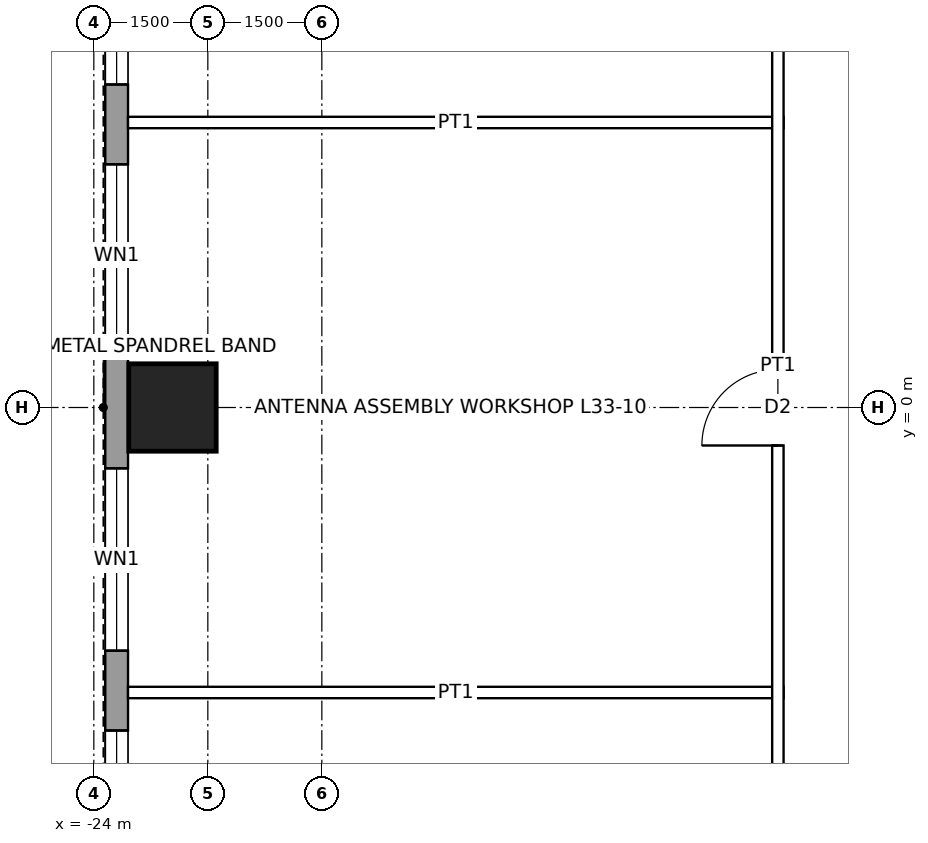
"""IFC4 building model, lengths in metres.
Left out: names, types, materials, properties, quantities, classifications, styles, units other than length and angle.
Written with IfcOpenShell. Run it as: python <this file> out.ifc"""

import sys

from ifc_helpers import new_model, si_unit, direction, frame, frame_2d, origin, origin_2d, place, context, subcontext, project, spatial, rectangle, hollow_rectangle, extrude, element, fill, save


model = new_model("IFC4")
c1 = context("Model", 3, precision=1e-05, world=origin(), true_north=direction((0.0, 1.0)))
c2 = subcontext(c1, "Body", "Model", "MODEL_VIEW")
j1 = project(units=[si_unit("LENGTHUNIT", "METRE"), si_unit("PLANEANGLEUNIT", "RADIAN")], contexts=[c1])
p1 = place(None, origin())
s1 = spatial("IfcSite", under=j1, at=p1, CompositionType="ELEMENT")
p2 = place(p1, origin())
s2 = spatial("IfcBuilding", under=s1, at=p2, CompositionType="ELEMENT")
p3 = place(p2, frame((0.0, 0.0, 162.9)))
s3 = spatial("IfcBuildingStorey", under=s2, at=p3, CompositionType="ELEMENT", Elevation=162.9)
p4 = place(p3, frame((-22.965, 0.0, 0.0), z_axis=(0.0, 0.0, 1.0), x_axis=(1.0, 0.0, 0.0)))
e1 = element("IfcColumn", 1, at=p4, inside=s3, PredefinedType="COLUMN", context=c2, shape_type="SweptSolid", body=[
    extrude(hollow_rectangle(XDim=1.15, YDim=1.15, WallThickness=0.075, at=origin_2d()), origin(), (0.0, 0.0, 1.0), 4.5),
])
p5 = place(p3, frame((-23.7, -16.2, 0.0), z_axis=(0.0, 0.0, 1.0), x_axis=(0.0, 1.0, 0.0)))
e2 = element("IfcWall", 2, at=p5, inside=s3, PredefinedType="SOLIDWALL", context=c2, shape_type="SweptSolid", body=[
    extrude(rectangle(XDim=32.4, YDim=0.3, at=frame_2d((16.2, 0.0))), origin(), (0.0, 0.0, 1.0), 4.3),
])
p6 = place(p5, frame((5.35, 0.0, 1.0)))
e3 = element("IfcOpeningElement", 3, at=p6, cuts=e2, PredefinedType="OPENING", context=c2, shape_type="SweptSolid", body=[
    extrude(rectangle(XDim=1.8, YDim=1.2, at=frame_2d((0.9, 0.6))), frame((0.0, 0.16, 0.0), z_axis=(0.0, -1.0, 0.0), x_axis=(1.0, 0.0, 0.0)), (0.0, 0.0, 1.0), 0.32),
])
p7 = place(p5, frame((7.45, 0.0, 1.0)))
e4 = element("IfcOpeningElement", 4, at=p7, cuts=e2, PredefinedType="OPENING", context=c2, shape_type="SweptSolid", body=[
    extrude(rectangle(XDim=1.8, YDim=1.2, at=frame_2d((0.9, 0.6))), frame((0.0, 0.16, 0.0), z_axis=(0.0, -1.0, 0.0), x_axis=(1.0, 0.0, 0.0)), (0.0, 0.0, 1.0), 0.32),
])
p8 = place(p5, frame((9.55, 0.0, 1.0)))
e5 = element("IfcOpeningElement", 5, at=p8, cuts=e2, PredefinedType="OPENING", context=c2, shape_type="SweptSolid", body=[
    extrude(rectangle(XDim=2.4, YDim=1.2, at=frame_2d((1.2, 0.6))), frame((0.0, 0.16, 0.0), z_axis=(0.0, -1.0, 0.0), x_axis=(1.0, 0.0, 0.0)), (0.0, 0.0, 1.0), 0.32),
])
p9 = place(p5, frame((13.0, 0.0, 1.0)))
e6 = element("IfcOpeningElement", 6, at=p9, cuts=e2, PredefinedType="OPENING", context=c2, shape_type="SweptSolid", body=[
    extrude(rectangle(XDim=2.4, YDim=1.2, at=frame_2d((1.2, 0.6))), frame((0.0, 0.16, 0.0), z_axis=(0.0, -1.0, 0.0), x_axis=(1.0, 0.0, 0.0)), (0.0, 0.0, 1.0), 0.32),
])
p10 = place(p5, frame((17.0, 0.0, 1.0)))
e7 = element("IfcOpeningElement", 7, at=p10, cuts=e2, PredefinedType="OPENING", context=c2, shape_type="SweptSolid", body=[
    extrude(rectangle(XDim=2.4, YDim=1.2, at=frame_2d((1.2, 0.6))), frame((0.0, 0.16, 0.0), z_axis=(0.0, -1.0, 0.0), x_axis=(1.0, 0.0, 0.0)), (0.0, 0.0, 1.0), 0.32),
])
p11 = place(p5, frame((20.45, 0.0, 1.0)))
e8 = element("IfcOpeningElement", 8, at=p11, cuts=e2, PredefinedType="OPENING", context=c2, shape_type="SweptSolid", body=[
    extrude(rectangle(XDim=2.4, YDim=1.2, at=frame_2d((1.2, 0.6))), frame((0.0, 0.16, 0.0), z_axis=(0.0, -1.0, 0.0), x_axis=(1.0, 0.0, 0.0)), (0.0, 0.0, 1.0), 0.32),
])
p12 = place(p5, frame((23.15, 0.0, 1.0)))
e9 = element("IfcOpeningElement", 9, at=p12, cuts=e2, PredefinedType="OPENING", context=c2, shape_type="SweptSolid", body=[
    extrude(rectangle(XDim=1.8, YDim=1.2, at=frame_2d((0.9, 0.6))), frame((0.0, 0.16, 0.0), z_axis=(0.0, -1.0, 0.0), x_axis=(1.0, 0.0, 0.0)), (0.0, 0.0, 1.0), 0.32),
])
p13 = place(p5, frame((25.25, 0.0, 1.0)))
e10 = element("IfcOpeningElement", 10, at=p13, cuts=e2, PredefinedType="OPENING", context=c2, shape_type="SweptSolid", body=[
    extrude(rectangle(XDim=1.8, YDim=1.2, at=frame_2d((0.9, 0.6))), frame((0.0, 0.16, 0.0), z_axis=(0.0, -1.0, 0.0), x_axis=(1.0, 0.0, 0.0)), (0.0, 0.0, 1.0), 0.32),
])
for number, where, z_axis, x_axis in (
    (11, (-23.55, -3.75, 0.0), (0.0, 0.0, 1.0), (1.0, 0.0, 0.0)),
    (12, (-23.55, 3.75, 0.0), (0.0, 0.0, 1.0), (1.0, 0.0, 0.0)),
):
    element("IfcWall", number, at=place(p3, frame(where, z_axis=z_axis, x_axis=x_axis)), inside=s3, PredefinedType="PARTITIONING", context=c2, shape_type="SweptSolid", body=[
        extrude(rectangle(XDim=8.625, YDim=0.15, at=frame_2d((4.312, 0.0))), origin(), (0.0, 0.0, 1.0), 3.431),
    ])
p14 = place(p3, frame((-15.0, -15.075, 0.0), z_axis=(0.0, 0.0, 1.0), x_axis=(0.0, 1.0, 0.0)))
e13 = element("IfcWall", 13, at=p14, inside=s3, PredefinedType="PARTITIONING", context=c2, shape_type="SweptSolid", body=[
    extrude(rectangle(XDim=30.15, YDim=0.15, at=frame_2d((15.075, 0.0))), origin(), (0.0, 0.0, 1.0), 4.3),
])
p15 = place(p14, frame((7.075, 0.0, 0.0)))
e14 = element("IfcOpeningElement", 14, at=p15, cuts=e13, PredefinedType="OPENING", context=c2, shape_type="SweptSolid", body=[
    extrude(rectangle(XDim=1.0, YDim=2.1, at=frame_2d((0.5, 1.05))), frame((0.0, 0.085, 0.0), z_axis=(0.0, -1.0, 0.0), x_axis=(1.0, 0.0, 0.0)), (0.0, 0.0, 1.0), 0.17),
])
p16 = place(p14, frame((14.575, 0.0, 0.0)))
e15 = element("IfcOpeningElement", 15, at=p16, cuts=e13, PredefinedType="OPENING", context=c2, shape_type="SweptSolid", body=[
    extrude(rectangle(XDim=1.0, YDim=2.1, at=frame_2d((0.5, 1.05))), frame((0.0, 0.085, 0.0), z_axis=(0.0, -1.0, 0.0), x_axis=(1.0, 0.0, 0.0)), (0.0, 0.0, 1.0), 0.17),
])
p17 = place(p14, frame((21.675, 0.0, 0.0)))
e16 = element("IfcOpeningElement", 16, at=p17, cuts=e13, PredefinedType="OPENING", context=c2, shape_type="SweptSolid", body=[
    extrude(rectangle(XDim=1.8, YDim=2.4, at=frame_2d((0.9, 1.2))), frame((0.0, 0.085, 0.0), z_axis=(0.0, -1.0, 0.0), x_axis=(1.0, 0.0, 0.0)), (0.0, 0.0, 1.0), 0.17),
])
p18 = place(p8, origin())
e17 = element("IfcWindow", 17, at=p18, inside=s3, PartitioningType="SINGLE_PANEL", PredefinedType="WINDOW", context=c2, shape_type="SweptSolid", body=[
    extrude(rectangle(XDim=2.4, YDim=1.2, at=frame_2d((1.2, 0.6))), frame((0.0, 0.03, 0.0), z_axis=(0.0, -1.0, 0.0), x_axis=(1.0, 0.0, 0.0)), (0.0, 0.0, 1.0), 0.06),
])
fill(e5, e17)
p19 = place(p9, origin())
e18 = element("IfcWindow", 18, at=p19, inside=s3, PartitioningType="SINGLE_PANEL", PredefinedType="WINDOW", context=c2, shape_type="SweptSolid", body=[
    extrude(rectangle(XDim=2.4, YDim=1.2, at=frame_2d((1.2, 0.6))), frame((0.0, 0.03, 0.0), z_axis=(0.0, -1.0, 0.0), x_axis=(1.0, 0.0, 0.0)), (0.0, 0.0, 1.0), 0.06),
])
fill(e6, e18)
p20 = place(p10, origin())
e19 = element("IfcWindow", 19, at=p20, inside=s3, PartitioningType="SINGLE_PANEL", PredefinedType="WINDOW", context=c2, shape_type="SweptSolid", body=[
    extrude(rectangle(XDim=2.4, YDim=1.2, at=frame_2d((1.2, 0.6))), frame((0.0, 0.03, 0.0), z_axis=(0.0, -1.0, 0.0), x_axis=(1.0, 0.0, 0.0)), (0.0, 0.0, 1.0), 0.06),
])
fill(e7, e19)
p21 = place(p11, origin())
e20 = element("IfcWindow", 20, at=p21, inside=s3, PartitioningType="SINGLE_PANEL", PredefinedType="WINDOW", context=c2, shape_type="SweptSolid", body=[
    extrude(rectangle(XDim=2.4, YDim=1.2, at=frame_2d((1.2, 0.6))), frame((0.0, 0.03, 0.0), z_axis=(0.0, -1.0, 0.0), x_axis=(1.0, 0.0, 0.0)), (0.0, 0.0, 1.0), 0.06),
])
fill(e8, e20)
p22 = place(p16, origin())
e21 = element("IfcDoor", 21, at=p22, inside=s3, OperationType="SINGLE_SWING_LEFT", PredefinedType="DOOR", context=c2, shape_type="SweptSolid", body=[
    extrude(rectangle(XDim=1.0, YDim=2.1, at=frame_2d((0.5, 1.05))), frame((0.0, 0.025, 0.0), z_axis=(0.0, -1.0, 0.0), x_axis=(1.0, 0.0, 0.0)), (0.0, 0.0, 1.0), 0.05),
])
fill(e15, e21)
save(model, sys.argv[1])
